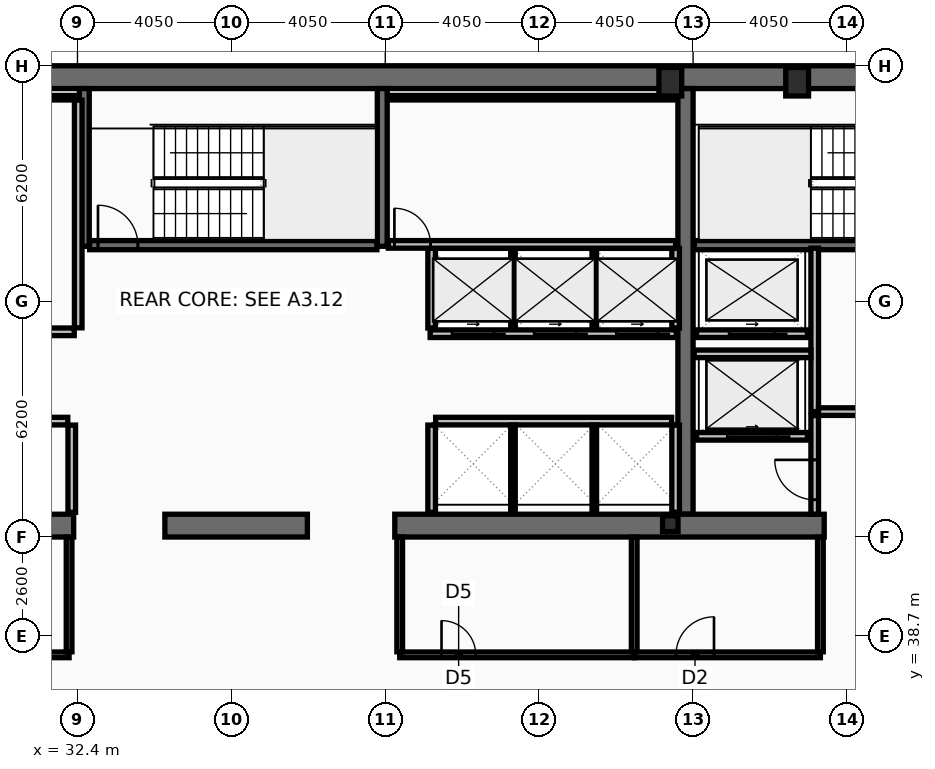
"""IFC4 building model, lengths in metres.
Left out: names, types, materials, properties, quantities, classifications, styles, units other than length and angle.
Written with IfcOpenShell. Run it as: python <this file> out.ifc"""

import sys

from ifc_helpers import new_model, si_unit, direction, frame, frame_2d, origin, origin_2d, place, context, subcontext, project, spatial, rectangle, hollow_rectangle, i_section, extrude, element, fill, save


model = new_model("IFC4")
c1 = context("Model", 3, precision=1e-05, world=origin(), true_north=direction((0.0, 1.0)))
c2 = subcontext(c1, "Body", "Model", "MODEL_VIEW")
j1 = project(units=[si_unit("LENGTHUNIT", "METRE"), si_unit("PLANEANGLEUNIT", "RADIAN")], contexts=[c1])
p1 = place(None, origin())
s1 = spatial("IfcSite", under=j1, at=p1, CompositionType="ELEMENT")
p2 = place(p1, origin())
s2 = spatial("IfcBuilding", under=s1, at=p2, CompositionType="ELEMENT")
p3 = place(p2, frame((0.0, 0.0, 249.8)))
s3 = spatial("IfcBuildingStorey", under=s2, at=p3, CompositionType="ELEMENT", Elevation=249.8)
p4 = place(p3, frame((16.2, 53.4, 0.0), z_axis=(0.0, 0.0, 1.0), x_axis=(1.0, 0.0, 0.0)))
e1 = element("IfcWall", 1, at=p4, inside=s3, PredefinedType="SHEAR", context=c2, shape_type="SweptSolid", body=[
    extrude(rectangle(XDim=40.5, YDim=0.6, at=frame_2d((20.25, 0.0))), origin(), (0.0, 0.0, 1.0), 3.44),
])
p5 = place(p3, frame((48.4, 41.9, 0.0), z_axis=(0.0, 0.0, 1.0), x_axis=(0.0, 1.0, 0.0)))
e2 = element("IfcWall", 2, at=p5, inside=s3, PredefinedType="SHEAR", context=c2, shape_type="SweptSolid", body=[
    extrude(rectangle(XDim=11.2, YDim=0.4, at=frame_2d((5.6, 0.0))), origin(), (0.0, 0.0, 1.0), 3.44),
])
p6 = place(p3, frame((32.3, 41.6, 0.0), z_axis=(0.0, 0.0, 1.0), x_axis=(-1.0, 0.0, 0.0)))
e3 = element("IfcWall", 3, at=p6, inside=s3, PredefinedType="SHEAR", context=c2, shape_type="SweptSolid", body=[
    extrude(rectangle(XDim=11.45, YDim=0.6, at=frame_2d((5.725, 0.0))), origin(), (0.0, 0.0, 1.0), 3.44),
])
p7 = place(p3, frame((38.45, 41.6, 0.0), z_axis=(0.0, 0.0, 1.0), x_axis=(-1.0, 0.0, 0.0)))
e4 = element("IfcWall", 4, at=p7, inside=s3, PredefinedType="SHEAR", context=c2, shape_type="SweptSolid", body=[
    extrude(rectangle(XDim=3.75, YDim=0.6, at=frame_2d((1.875, 0.0))), origin(), (0.0, 0.0, 1.0), 3.44),
])
p8 = place(p3, frame((52.05, 41.6, 0.0), z_axis=(0.0, 0.0, 1.0), x_axis=(-1.0, 0.0, 0.0)))
e5 = element("IfcWall", 5, at=p8, inside=s3, PredefinedType="SHEAR", context=c2, shape_type="SweptSolid", body=[
    extrude(rectangle(XDim=11.3, YDim=0.6, at=frame_2d((5.65, 0.0))), origin(), (0.0, 0.0, 1.0), 3.44),
])
for number, where, z_axis, x_axis in (
    (6, (32.58, 48.95, 0.0), (0.0, 0.0, 1.0), (0.0, 1.0, 0.0)),
    (7, (40.42, 48.95, 0.0), (0.0, 0.0, 1.0), (0.0, 1.0, 0.0)),
):
    element("IfcWall", number, at=place(p3, frame(where, z_axis=z_axis, x_axis=x_axis)), inside=s3, PredefinedType="SHEAR", context=c2, shape_type="SweptSolid", body=[
        extrude(rectangle(XDim=4.15, YDim=0.26, at=frame_2d((2.075, 0.0))), origin(), (0.0, 0.0, 1.0), 3.44),
    ])
p9 = place(p3, frame((48.63, 48.98, 0.0), z_axis=(0.0, 0.0, 1.0), x_axis=(1.0, 0.0, 0.0)))
e8 = element("IfcWall", 8, at=p9, inside=s3, PredefinedType="SHEAR", context=c2, shape_type="SweptSolid", body=[
    extrude(rectangle(XDim=7.47, YDim=0.24, at=frame_2d((3.735, 0.0))), origin(), (0.0, 0.0, 1.0), 3.44),
])
p10 = place(p9, frame((6.2, 0.0, 0.0)))
e9 = element("IfcOpeningElement", 9, at=p10, cuts=e8, PredefinedType="OPENING", context=c2, shape_type="SweptSolid", body=[
    extrude(rectangle(XDim=1.05, YDim=2.15, at=frame_2d((0.525, 1.075))), frame((0.0, 0.13, 0.0), z_axis=(0.0, -1.0, 0.0), x_axis=(1.0, 0.0, 0.0)), (0.0, 0.0, 1.0), 0.26),
])
p11 = place(p3, frame((32.72, 48.98, 0.0), z_axis=(0.0, 0.0, 1.0), x_axis=(1.0, 0.0, 0.0)))
e10 = element("IfcWall", 10, at=p11, inside=s3, PredefinedType="SHEAR", context=c2, shape_type="SweptSolid", body=[
    extrude(rectangle(XDim=7.56, YDim=0.24, at=frame_2d((3.78, 0.0))), origin(), (0.0, 0.0, 1.0), 3.44),
])
p12 = place(p11, frame((0.22, 0.0, 0.0)))
e11 = element("IfcOpeningElement", 11, at=p12, cuts=e10, PredefinedType="OPENING", context=c2, shape_type="SweptSolid", body=[
    extrude(rectangle(XDim=1.05, YDim=2.15, at=frame_2d((0.525, 1.075))), frame((0.0, 0.13, 0.0), z_axis=(0.0, -1.0, 0.0), x_axis=(1.0, 0.0, 0.0)), (0.0, 0.0, 1.0), 0.26),
])
for number, where, z_axis, x_axis in (
    (12, (48.0, 53.28, 0.0), (0.0, 0.0, 1.0), (1.0, 0.0, 0.0)),
    (13, (51.337, 53.28, 0.0), (0.0, 0.0, 1.0), (1.0, 0.0, 0.0)),
):
    element("IfcColumn", number, at=place(p3, frame(where, z_axis=z_axis, x_axis=x_axis)), inside=s3, PredefinedType="COLUMN", context=c2, shape_type="SweptSolid", body=[
        extrude(hollow_rectangle(XDim=0.6, YDim=0.75, WallThickness=0.045, at=origin_2d()), origin(), (0.0, 0.0, 1.0), 3.6),
    ])
p13 = place(p3, frame((48.0, 41.65, 0.0), z_axis=(0.0, 0.0, 1.0), x_axis=(1.0, 0.0, 0.0)))
e14 = element("IfcColumn", 14, at=p13, inside=s3, PredefinedType="COLUMN", context=c2, shape_type="SweptSolid", body=[
    extrude(i_section(OverallWidth=0.406, OverallDepth=0.416, WebThickness=0.03, FlangeThickness=0.048, at=origin_2d()), origin(), (0.0, 0.0, 1.0), 3.6),
])
p14 = place(p3, frame((51.61, 43.95, 0.0), z_axis=(0.0, 0.0, 1.0), x_axis=(-1.0, 0.0, 0.0)))
e15 = element("IfcWall", 15, at=p14, inside=s3, PredefinedType="PARTITIONING", context=c2, shape_type="SweptSolid", body=[
    extrude(rectangle(XDim=2.92, YDim=0.2, at=frame_2d((1.46, 0.0))), origin(), (0.0, 0.0, 1.0), 3.44),
])
p15 = place(p14, frame((0.81, 0.0, 0.0)))
e16 = element("IfcOpeningElement", 16, at=p15, cuts=e15, PredefinedType="OPENING", context=c2, shape_type="SweptSolid", body=[
    extrude(rectangle(XDim=1.3, YDim=2.18, at=frame_2d((0.65, 1.09))), frame((0.0, 0.11, 0.0), z_axis=(0.0, -1.0, 0.0), x_axis=(1.0, 0.0, 0.0)), (0.0, 0.0, 1.0), 0.22),
])
p16 = place(p3, frame((51.61, 46.65, 0.0), z_axis=(0.0, 0.0, 1.0), x_axis=(-1.0, 0.0, 0.0)))
e17 = element("IfcWall", 17, at=p16, inside=s3, PredefinedType="PARTITIONING", context=c2, shape_type="SweptSolid", body=[
    extrude(rectangle(XDim=2.92, YDim=0.2, at=frame_2d((1.46, 0.0))), origin(), (0.0, 0.0, 1.0), 3.44),
])
p17 = place(p16, frame((0.86, 0.0, 0.0)))
e18 = element("IfcOpeningElement", 18, at=p17, cuts=e17, PredefinedType="OPENING", context=c2, shape_type="SweptSolid", body=[
    extrude(rectangle(XDim=1.2, YDim=2.18, at=frame_2d((0.6, 1.09))), frame((0.0, 0.11, 0.0), z_axis=(0.0, -1.0, 0.0), x_axis=(1.0, 0.0, 0.0)), (0.0, 0.0, 1.0), 0.22),
])
p18 = place(p3, frame((48.16, 46.65, 0.0), z_axis=(0.0, 0.0, 1.0), x_axis=(-1.0, 0.0, 0.0)))
e19 = element("IfcWall", 19, at=p18, inside=s3, PredefinedType="PARTITIONING", context=c2, shape_type="SweptSolid", body=[
    extrude(rectangle(XDim=6.48, YDim=0.2, at=frame_2d((3.24, 0.0))), origin(), (0.0, 0.0, 1.0), 3.44),
])
p19 = place(p18, frame((4.8, 0.0, 0.0)))
e20 = element("IfcOpeningElement", 20, at=p19, cuts=e19, PredefinedType="OPENING", context=c2, shape_type="SweptSolid", body=[
    extrude(rectangle(XDim=1.1, YDim=2.18, at=frame_2d((0.55, 1.09))), frame((0.0, 0.11, 0.0), z_axis=(0.0, -1.0, 0.0), x_axis=(1.0, 0.0, 0.0)), (0.0, 0.0, 1.0), 0.22),
])
p20 = place(p18, frame((2.64, 0.0, 0.0)))
e21 = element("IfcOpeningElement", 21, at=p20, cuts=e19, PredefinedType="OPENING", context=c2, shape_type="SweptSolid", body=[
    extrude(rectangle(XDim=1.1, YDim=2.18, at=frame_2d((0.55, 1.09))), frame((0.0, 0.11, 0.0), z_axis=(0.0, -1.0, 0.0), x_axis=(1.0, 0.0, 0.0)), (0.0, 0.0, 1.0), 0.22),
])
p21 = place(p18, frame((0.48, 0.0, 0.0)))
e22 = element("IfcOpeningElement", 22, at=p21, cuts=e19, PredefinedType="OPENING", context=c2, shape_type="SweptSolid", body=[
    extrude(rectangle(XDim=1.1, YDim=2.18, at=frame_2d((0.55, 1.09))), frame((0.0, 0.11, 0.0), z_axis=(0.0, -1.0, 0.0), x_axis=(1.0, 0.0, 0.0)), (0.0, 0.0, 1.0), 0.22),
])
p22 = place(p3, frame((51.8, 44.6, 0.0), z_axis=(0.0, 0.0, 1.0), x_axis=(0.0, 1.0, 0.0)))
e23 = element("IfcWall", 23, at=p22, inside=s3, PredefinedType="PARTITIONING", context=c2, shape_type="SweptSolid", body=[
    extrude(rectangle(XDim=4.3, YDim=0.2, at=frame_2d((2.15, 0.0))), origin(), (0.0, 0.0, 1.0), 3.44),
])
p23 = place(p3, frame((51.9, 44.6, 0.0), z_axis=(0.0, 0.0, 1.0), x_axis=(1.0, 0.0, 0.0)))
e24 = element("IfcWall", 24, at=p23, inside=s3, PredefinedType="PARTITIONING", context=c2, shape_type="SweptSolid", body=[
    extrude(rectangle(XDim=4.2, YDim=0.2, at=frame_2d((2.1, 0.0))), origin(), (0.0, 0.0, 1.0), 3.44),
])
p24 = place(p23, frame((1.15, 0.0, 0.0)))
e25 = element("IfcOpeningElement", 25, at=p24, cuts=e24, PredefinedType="OPENING", context=c2, shape_type="SweptSolid", body=[
    extrude(rectangle(XDim=1.05, YDim=2.15, at=frame_2d((0.525, 1.075))), frame((0.0, 0.11, 0.0), z_axis=(0.0, -1.0, 0.0), x_axis=(1.0, 0.0, 0.0)), (0.0, 0.0, 1.0), 0.22),
])
p25 = place(p3, frame((48.63, 46.12, 0.0), z_axis=(0.0, 0.0, 1.0), x_axis=(1.0, 0.0, 0.0)))
e26 = element("IfcWall", 26, at=p25, inside=s3, PredefinedType="PARTITIONING", context=c2, shape_type="SweptSolid", body=[
    extrude(rectangle(XDim=3.07, YDim=0.2, at=frame_2d((1.535, 0.0))), origin(), (0.0, 0.0, 1.0), 3.44),
])
p26 = place(p3, frame((51.8, 41.9, 0.0), z_axis=(0.0, 0.0, 1.0), x_axis=(0.0, 1.0, 0.0)))
e27 = element("IfcWall", 27, at=p26, inside=s3, PredefinedType="PARTITIONING", context=c2, shape_type="SweptSolid", body=[
    extrude(rectangle(XDim=2.595, YDim=0.2, at=frame_2d((1.298, 0.0))), origin(), (0.0, 0.0, 1.0), 3.44),
])
p27 = place(p26, frame((0.38, 0.0, 0.0)))
e28 = element("IfcOpeningElement", 28, at=p27, cuts=e27, PredefinedType="OPENING", context=c2, shape_type="SweptSolid", body=[
    extrude(rectangle(XDim=1.05, YDim=2.15, at=frame_2d((0.525, 1.075))), frame((0.0, 0.11, 0.0), z_axis=(0.0, -1.0, 0.0), x_axis=(1.0, 0.0, 0.0)), (0.0, 0.0, 1.0), 0.22),
])
p28 = place(p3, frame((32.42, 46.805, 0.0), z_axis=(0.0, 0.0, 1.0), x_axis=(0.0, 1.0, 0.0)))
e29 = element("IfcWall", 29, at=p28, inside=s3, PredefinedType="PARTITIONING", context=c2, shape_type="SweptSolid", body=[
    extrude(rectangle(XDim=5.99, YDim=0.2, at=frame_2d((2.995, 0.0))), origin(), (0.0, 0.0, 1.0), 3.44),
])
p29 = place(p3, frame((24.805, 52.86, 0.0), z_axis=(0.0, 0.0, 1.0), x_axis=(1.0, 0.0, 0.0)))
e30 = element("IfcWall", 30, at=p29, inside=s3, PredefinedType="PARTITIONING", context=c2, shape_type="SweptSolid", body=[
    extrude(rectangle(XDim=7.51, YDim=0.12, at=frame_2d((3.755, 0.0))), origin(), (0.0, 0.0, 1.0), 3.44),
])
p30 = place(p3, frame((24.805, 46.7, 0.0), z_axis=(0.0, 0.0, 1.0), x_axis=(1.0, 0.0, 0.0)))
e31 = element("IfcWall", 31, at=p30, inside=s3, PredefinedType="PARTITIONING", context=c2, shape_type="SweptSolid", body=[
    extrude(rectangle(XDim=7.51, YDim=0.2, at=frame_2d((3.755, 0.0))), origin(), (0.0, 0.0, 1.0), 3.44),
])
p31 = place(p30, frame((2.4, 0.0, 0.0)))
e32 = element("IfcOpeningElement", 32, at=p31, cuts=e31, PredefinedType="OPENING", context=c2, shape_type="SweptSolid", body=[
    extrude(rectangle(XDim=0.95, YDim=2.1, at=frame_2d((0.475, 1.05))), frame((0.0, 0.11, 0.0), z_axis=(0.0, -1.0, 0.0), x_axis=(1.0, 0.0, 0.0)), (0.0, 0.0, 1.0), 0.22),
])
p32 = place(p3, frame((32.25, 41.95, 0.0), z_axis=(0.0, 0.0, 1.0), x_axis=(0.0, 1.0, 0.0)))
e33 = element("IfcWall", 33, at=p32, inside=s3, PredefinedType="PARTITIONING", context=c2, shape_type="SweptSolid", body=[
    extrude(rectangle(XDim=2.295, YDim=0.2, at=frame_2d((1.147, 0.0))), origin(), (0.0, 0.0, 1.0), 3.44),
])
p33 = place(p3, frame((24.805, 44.35, 0.0), z_axis=(0.0, 0.0, 1.0), x_axis=(1.0, 0.0, 0.0)))
e34 = element("IfcWall", 34, at=p33, inside=s3, PredefinedType="PARTITIONING", context=c2, shape_type="SweptSolid", body=[
    extrude(rectangle(XDim=7.34, YDim=0.2, at=frame_2d((3.67, 0.0))), origin(), (0.0, 0.0, 1.0), 3.44),
])
p34 = place(p33, frame((2.4, 0.0, 0.0)))
e35 = element("IfcOpeningElement", 35, at=p34, cuts=e34, PredefinedType="OPENING", context=c2, shape_type="SweptSolid", body=[
    extrude(rectangle(XDim=0.95, YDim=2.1, at=frame_2d((0.475, 1.05))), frame((0.0, 0.11, 0.0), z_axis=(0.0, -1.0, 0.0), x_axis=(1.0, 0.0, 0.0)), (0.0, 0.0, 1.0), 0.22),
])
for number, where, z_axis, x_axis in (
    (36, (41.72, 46.8, 0.0), (0.0, 0.0, 1.0), (0.0, 1.0, 0.0)),
    (37, (48.14, 46.8, 0.0), (0.0, 0.0, 1.0), (0.0, 1.0, 0.0)),
):
    element("IfcWall", number, at=place(p3, frame(where, z_axis=z_axis, x_axis=x_axis)), inside=s3, PredefinedType="PARTITIONING", context=c2, shape_type="SweptSolid", body=[
        extrude(rectangle(XDim=2.095, YDim=0.2, at=frame_2d((1.047, 0.0))), origin(), (0.0, 0.0, 1.0), 3.44),
    ])
for number, where, z_axis, x_axis in (
    (38, (43.86, 46.8, 0.0), (0.0, 0.0, 1.0), (0.0, 1.0, 0.0)),
    (39, (46.0, 46.8, 0.0), (0.0, 0.0, 1.0), (0.0, 1.0, 0.0)),
):
    element("IfcWall", number, at=place(p3, frame(where, z_axis=z_axis, x_axis=x_axis)), inside=s3, PredefinedType="PARTITIONING", context=c2, shape_type="SweptSolid", body=[
        extrude(rectangle(XDim=2.095, YDim=0.12, at=frame_2d((1.047, 0.0))), origin(), (0.0, 0.0, 1.0), 3.44),
    ])
p35 = place(p3, frame((41.825, 44.35, 0.0), z_axis=(0.0, 0.0, 1.0), x_axis=(1.0, 0.0, 0.0)))
e40 = element("IfcWall", 40, at=p35, inside=s3, PredefinedType="PARTITIONING", context=c2, shape_type="SweptSolid", body=[
    extrude(rectangle(XDim=6.21, YDim=0.2, at=frame_2d((3.105, 0.0))), origin(), (0.0, 0.0, 1.0), 3.44),
])
for number, where, z_axis, x_axis in (
    (41, (41.72, 41.95, 0.0), (0.0, 0.0, 1.0), (0.0, 1.0, 0.0)),
    (42, (48.14, 41.95, 0.0), (0.0, 0.0, 1.0), (0.0, 1.0, 0.0)),
):
    element("IfcWall", number, at=place(p3, frame(where, z_axis=z_axis, x_axis=x_axis)), inside=s3, PredefinedType="PARTITIONING", context=c2, shape_type="SweptSolid", body=[
        extrude(rectangle(XDim=2.295, YDim=0.2, at=frame_2d((1.147, 0.0))), origin(), (0.0, 0.0, 1.0), 3.44),
    ])
for number, where, z_axis, x_axis in (
    (43, (43.86, 41.95, 0.0), (0.0, 0.0, 1.0), (0.0, 1.0, 0.0)),
    (44, (46.0, 41.95, 0.0), (0.0, 0.0, 1.0), (0.0, 1.0, 0.0)),
):
    element("IfcWall", number, at=place(p3, frame(where, z_axis=z_axis, x_axis=x_axis)), inside=s3, PredefinedType="PARTITIONING", context=c2, shape_type="SweptSolid", body=[
        extrude(rectangle(XDim=2.295, YDim=0.12, at=frame_2d((1.147, 0.0))), origin(), (0.0, 0.0, 1.0), 3.44),
    ])
p36 = place(p3, frame((40.58, 52.86, 0.0), z_axis=(0.0, 0.0, 1.0), x_axis=(1.0, 0.0, 0.0)))
e45 = element("IfcWall", 45, at=p36, inside=s3, PredefinedType="PARTITIONING", context=c2, shape_type="SweptSolid", body=[
    extrude(rectangle(XDim=7.56, YDim=0.12, at=frame_2d((3.78, 0.0))), origin(), (0.0, 0.0, 1.0), 3.44),
])
p37 = place(p3, frame((40.58, 49.0, 0.0), z_axis=(0.0, 0.0, 1.0), x_axis=(1.0, 0.0, 0.0)))
e46 = element("IfcWall", 46, at=p37, inside=s3, PredefinedType="PARTITIONING", context=c2, shape_type="SweptSolid", body=[
    extrude(rectangle(XDim=7.56, YDim=0.2, at=frame_2d((3.78, 0.0))), origin(), (0.0, 0.0, 1.0), 3.44),
])
p38 = place(p37, frame((0.16, 0.0, 0.0)))
e47 = element("IfcOpeningElement", 47, at=p38, cuts=e46, PredefinedType="OPENING", context=c2, shape_type="SweptSolid", body=[
    extrude(rectangle(XDim=0.95, YDim=2.1, at=frame_2d((0.475, 1.05))), frame((0.0, 0.11, 0.0), z_axis=(0.0, -1.0, 0.0), x_axis=(1.0, 0.0, 0.0)), (0.0, 0.0, 1.0), 0.22),
])
p39 = place(p3, frame((29.2, 38.2, 0.0), z_axis=(0.0, 0.0, 1.0), x_axis=(1.0, 0.0, 0.0)))
e48 = element("IfcWall", 48, at=p39, inside=s3, PredefinedType="PARTITIONING", context=c2, shape_type="SweptSolid", body=[
    extrude(rectangle(XDim=2.98, YDim=0.15, at=frame_2d((1.49, 0.0))), origin(), (0.0, 0.0, 1.0), 2.78),
])
p40 = place(p39, frame((0.7, 0.0, 0.0)))
e49 = element("IfcOpeningElement", 49, at=p40, cuts=e48, PredefinedType="OPENING", context=c2, shape_type="SweptSolid", body=[
    extrude(rectangle(XDim=0.95, YDim=2.05, at=frame_2d((0.475, 1.025))), frame((0.0, 0.085, 0.0), z_axis=(0.0, -1.0, 0.0), x_axis=(1.0, 0.0, 0.0)), (0.0, 0.0, 1.0), 0.17),
])
p41 = place(p3, frame((32.18, 38.28, 0.0), z_axis=(0.0, 0.0, 1.0), x_axis=(0.0, 1.0, 0.0)))
e50 = element("IfcWall", 50, at=p41, inside=s3, PredefinedType="PARTITIONING", context=c2, shape_type="SweptSolid", body=[
    extrude(rectangle(XDim=3.02, YDim=0.15, at=frame_2d((1.51, 0.0))), origin(), (0.0, 0.0, 1.0), 3.44),
])
p42 = place(p3, frame((40.88, 38.2, 0.0), z_axis=(0.0, 0.0, 1.0), x_axis=(1.0, 0.0, 0.0)))
e51 = element("IfcWall", 51, at=p42, inside=s3, PredefinedType="PARTITIONING", context=c2, shape_type="SweptSolid", body=[
    extrude(rectangle(XDim=6.17, YDim=0.15, at=frame_2d((3.085, 0.0))), origin(), (0.0, 0.0, 1.0), 2.78),
])
p43 = place(p42, frame((1.1, 0.0, 0.0)))
e52 = element("IfcOpeningElement", 52, at=p43, cuts=e51, PredefinedType="OPENING", context=c2, shape_type="SweptSolid", body=[
    extrude(rectangle(XDim=0.9, YDim=2.05, at=frame_2d((0.45, 1.025))), frame((0.0, 0.085, 0.0), z_axis=(0.0, -1.0, 0.0), x_axis=(1.0, 0.0, 0.0)), (0.0, 0.0, 1.0), 0.17),
])
p44 = place(p3, frame((47.05, 38.2, 0.0), z_axis=(0.0, 0.0, 1.0), x_axis=(1.0, 0.0, 0.0)))
e53 = element("IfcWall", 53, at=p44, inside=s3, PredefinedType="PARTITIONING", context=c2, shape_type="SweptSolid", body=[
    extrude(rectangle(XDim=4.9, YDim=0.15, at=frame_2d((2.45, 0.0))), origin(), (0.0, 0.0, 1.0), 2.78),
])
p45 = place(p44, frame((1.1, 0.0, 0.0)))
e54 = element("IfcOpeningElement", 54, at=p45, cuts=e53, PredefinedType="OPENING", context=c2, shape_type="SweptSolid", body=[
    extrude(rectangle(XDim=1.0, YDim=2.05, at=frame_2d((0.5, 1.025))), frame((0.0, 0.085, 0.0), z_axis=(0.0, -1.0, 0.0), x_axis=(1.0, 0.0, 0.0)), (0.0, 0.0, 1.0), 0.17),
])
for number, where, z_axis, x_axis in (
    (55, (40.88, 38.28, 0.0), (0.0, 0.0, 1.0), (0.0, 1.0, 0.0)),
    (56, (47.05, 38.28, 0.0), (0.0, 0.0, 1.0), (0.0, 1.0, 0.0)),
    (57, (51.95, 38.28, 0.0), (0.0, 0.0, 1.0), (0.0, 1.0, 0.0)),
):
    element("IfcWall", number, at=place(p3, frame(where, z_axis=z_axis, x_axis=x_axis)), inside=s3, PredefinedType="PARTITIONING", context=c2, shape_type="SweptSolid", body=[
        extrude(rectangle(XDim=3.02, YDim=0.15, at=frame_2d((1.51, 0.0))), origin(), (0.0, 0.0, 1.0), 3.44),
    ])
p46 = place(p12, origin())
e58 = element("IfcDoor", 58, at=p46, inside=s3, OperationType="SINGLE_SWING_LEFT", PredefinedType="DOOR", context=c2, shape_type="SweptSolid", body=[
    extrude(rectangle(XDim=1.05, YDim=2.15, at=frame_2d((0.525, 1.075))), frame((0.0, 0.025, 0.0), z_axis=(0.0, -1.0, 0.0), x_axis=(1.0, 0.0, 0.0)), (0.0, 0.0, 1.0), 0.05),
])
fill(e11, e58)
p47 = place(p15, origin())
e59 = element("IfcDoor", 59, at=p47, inside=s3, OperationType="SLIDING_TO_LEFT", PredefinedType="DOOR", context=c2, shape_type="SweptSolid", body=[
    extrude(rectangle(XDim=1.3, YDim=2.18, at=frame_2d((0.65, 1.09))), frame((0.0, 0.025, 0.0), z_axis=(0.0, -1.0, 0.0), x_axis=(1.0, 0.0, 0.0)), (0.0, 0.0, 1.0), 0.05),
])
fill(e16, e59)
p48 = place(p17, origin())
e60 = element("IfcDoor", 60, at=p48, inside=s3, OperationType="SLIDING_TO_LEFT", PredefinedType="DOOR", context=c2, shape_type="SweptSolid", body=[
    extrude(rectangle(XDim=1.2, YDim=2.18, at=frame_2d((0.6, 1.09))), frame((0.0, 0.025, 0.0), z_axis=(0.0, -1.0, 0.0), x_axis=(1.0, 0.0, 0.0)), (0.0, 0.0, 1.0), 0.05),
])
fill(e18, e60)
p49 = place(p19, origin())
e61 = element("IfcDoor", 61, at=p49, inside=s3, OperationType="SLIDING_TO_LEFT", PredefinedType="DOOR", context=c2, shape_type="SweptSolid", body=[
    extrude(rectangle(XDim=1.1, YDim=2.18, at=frame_2d((0.55, 1.09))), frame((0.0, 0.025, 0.0), z_axis=(0.0, -1.0, 0.0), x_axis=(1.0, 0.0, 0.0)), (0.0, 0.0, 1.0), 0.05),
])
fill(e20, e61)
p50 = place(p20, origin())
e62 = element("IfcDoor", 62, at=p50, inside=s3, OperationType="SLIDING_TO_LEFT", PredefinedType="DOOR", context=c2, shape_type="SweptSolid", body=[
    extrude(rectangle(XDim=1.1, YDim=2.18, at=frame_2d((0.55, 1.09))), frame((0.0, 0.025, 0.0), z_axis=(0.0, -1.0, 0.0), x_axis=(1.0, 0.0, 0.0)), (0.0, 0.0, 1.0), 0.05),
])
fill(e21, e62)
p51 = place(p21, origin())
e63 = element("IfcDoor", 63, at=p51, inside=s3, OperationType="SLIDING_TO_LEFT", PredefinedType="DOOR", context=c2, shape_type="SweptSolid", body=[
    extrude(rectangle(XDim=1.1, YDim=2.18, at=frame_2d((0.55, 1.09))), frame((0.0, 0.025, 0.0), z_axis=(0.0, -1.0, 0.0), x_axis=(1.0, 0.0, 0.0)), (0.0, 0.0, 1.0), 0.05),
])
fill(e22, e63)
p52 = place(p27, origin())
e64 = element("IfcDoor", 64, at=p52, inside=s3, OperationType="SINGLE_SWING_RIGHT", PredefinedType="DOOR", context=c2, shape_type="SweptSolid", body=[
    extrude(rectangle(XDim=1.05, YDim=2.15, at=frame_2d((0.525, 1.075))), frame((0.0, 0.025, 0.0), z_axis=(0.0, -1.0, 0.0), x_axis=(1.0, 0.0, 0.0)), (0.0, 0.0, 1.0), 0.05),
])
fill(e28, e64)
p53 = place(p38, origin())
e65 = element("IfcDoor", 65, at=p53, inside=s3, OperationType="SINGLE_SWING_LEFT", PredefinedType="DOOR", context=c2, shape_type="SweptSolid", body=[
    extrude(rectangle(XDim=0.95, YDim=2.1, at=frame_2d((0.475, 1.05))), frame((0.0, 0.025, 0.0), z_axis=(0.0, -1.0, 0.0), x_axis=(1.0, 0.0, 0.0)), (0.0, 0.0, 1.0), 0.05),
])
fill(e47, e65)
p54 = place(p43, origin())
e66 = element("IfcDoor", 66, at=p54, inside=s3, OperationType="SINGLE_SWING_LEFT", PredefinedType="DOOR", context=c2, shape_type="SweptSolid", body=[
    extrude(rectangle(XDim=0.9, YDim=2.05, at=frame_2d((0.45, 1.025))), frame((0.0, 0.025, 0.0), z_axis=(0.0, -1.0, 0.0), x_axis=(1.0, 0.0, 0.0)), (0.0, 0.0, 1.0), 0.05),
])
fill(e52, e66)
p55 = place(p45, origin())
e67 = element("IfcDoor", 67, at=p55, inside=s3, OperationType="SINGLE_SWING_RIGHT", PredefinedType="DOOR", context=c2, shape_type="SweptSolid", body=[
    extrude(rectangle(XDim=1.0, YDim=2.05, at=frame_2d((0.5, 1.025))), frame((0.0, 0.025, 0.0), z_axis=(0.0, -1.0, 0.0), x_axis=(1.0, 0.0, 0.0)), (0.0, 0.0, 1.0), 0.05),
])
fill(e54, e67)
save(model, sys.argv[1])
